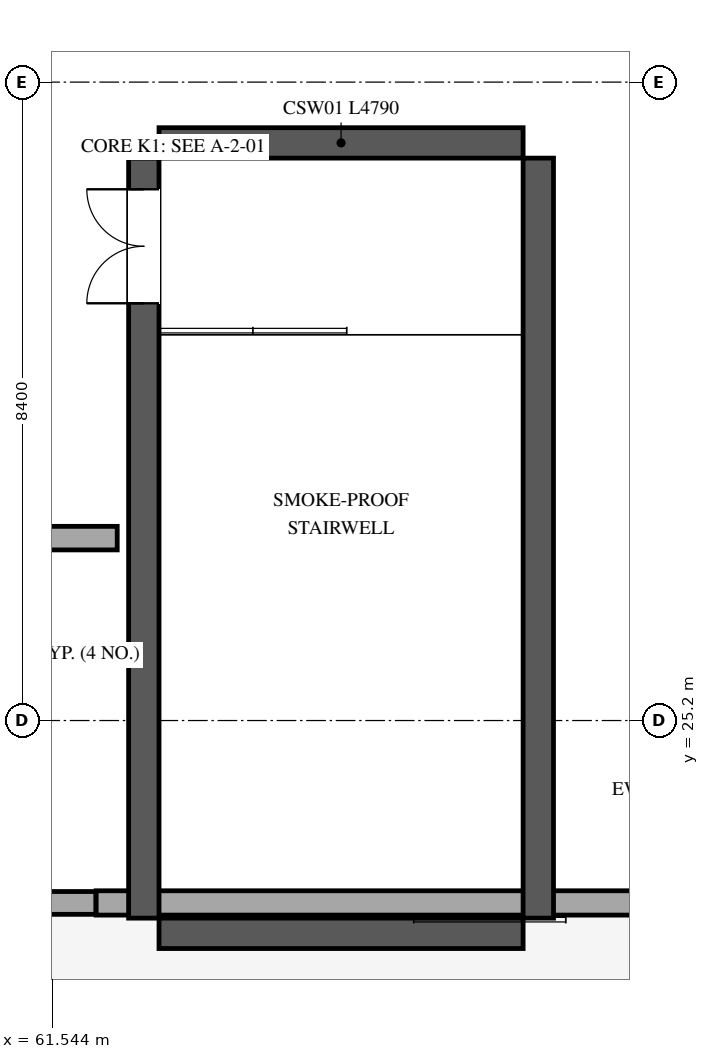
"""IFC4 building model, lengths in metres.
Left out: names, types, materials, properties, quantities, classifications, styles, units other than length and angle.
Written with IfcOpenShell. Run it as: python <this file> out.ifc"""

import sys

from ifc_helpers import new_model, si_unit, direction, frame, frame_2d, origin, place, context, subcontext, project, spatial, rectangle, extrude, element, fill, save


model = new_model("IFC4")
c1 = context("Model", 3, precision=1e-05, world=origin(), true_north=direction((0.0, 1.0)))
c2 = subcontext(c1, "Body", "Model", "MODEL_VIEW")
j1 = project(units=[si_unit("LENGTHUNIT", "METRE"), si_unit("PLANEANGLEUNIT", "RADIAN")], contexts=[c1])
p1 = place(None, origin())
s1 = spatial("IfcSite", under=j1, at=p1, CompositionType="ELEMENT")
p2 = place(p1, origin())
s2 = spatial("IfcBuilding", under=s1, at=p2, CompositionType="ELEMENT")
p3 = place(p2, frame((0.0, 0.0, 36.3)))
s3 = spatial("IfcBuildingStorey", under=s2, at=p3, CompositionType="ELEMENT", Elevation=36.3)
p4 = place(p3, frame((69.6, 22.8, 0.0), z_axis=(0.0, 0.0, 1.0), x_axis=(-1.0, 0.0, 0.0)))
e1 = element("IfcWall", 1, at=p4, inside=s3, PredefinedType="STANDARD", context=c2, shape_type="SweptSolid", body=[
    extrude(rectangle(XDim=7.478, YDim=0.32, at=frame_2d((3.739, 0.0))), origin(), (0.0, 0.0, 1.0), 4.49),
])
p5 = place(p3, frame((62.118, 22.8, 0.0), z_axis=(0.0, 0.0, 1.0), x_axis=(-1.0, 0.0, 0.0)))
e2 = element("IfcWall", 2, at=p5, inside=s3, PredefinedType="STANDARD", context=c2, shape_type="SweptSolid", body=[
    extrude(rectangle(XDim=7.476, YDim=0.3, at=frame_2d((3.738, 0.0))), origin(), (0.0, 0.0, 1.0), 4.49),
])
p6 = place(p5, frame((2.788, 0.0, 0.0)))
e3 = element("IfcOpeningElement", 3, at=p6, cuts=e2, PredefinedType="OPENING", context=c2, shape_type="SweptSolid", body=[
    extrude(rectangle(XDim=1.9, YDim=2.2, at=frame_2d((0.95, 1.1))), frame((0.0, 0.16, 0.0), z_axis=(0.0, -1.0, 0.0), x_axis=(1.0, 0.0, 0.0)), (0.0, 0.0, 1.0), 0.32),
])
p7 = place(p3, frame((62.75, 22.6, 0.0), z_axis=(0.0, 0.0, 1.0), x_axis=(0.0, 1.0, 0.0)))
e4 = element("IfcWall", 4, at=p7, inside=s3, PredefinedType="SHEAR", context=c2, shape_type="SweptSolid", body=[
    extrude(rectangle(XDim=10.0, YDim=0.4, at=frame_2d((5.0, 0.0))), origin(), (0.0, 0.0, 1.0), 4.8),
])
p8 = place(p7, frame((8.09, 0.0, 0.0)))
e5 = element("IfcOpeningElement", 5, at=p8, cuts=e4, PredefinedType="OPENING", context=c2, shape_type="SweptSolid", body=[
    extrude(rectangle(XDim=1.5, YDim=2.2, at=frame_2d((0.75, 1.1))), frame((0.0, 0.21, 0.0), z_axis=(0.0, -1.0, 0.0), x_axis=(1.0, 0.0, 0.0)), (0.0, 0.0, 1.0), 0.42),
])
p9 = place(p3, frame((67.94, 32.6, 0.0), z_axis=(0.0, 0.0, 1.0), x_axis=(0.0, -1.0, 0.0)))
e6 = element("IfcWall", 6, at=p9, inside=s3, PredefinedType="SHEAR", context=c2, shape_type="SweptSolid", body=[
    extrude(rectangle(XDim=10.0, YDim=0.4, at=frame_2d((5.0, 0.0))), origin(), (0.0, 0.0, 1.0), 4.8),
])
for number, where, z_axis, x_axis in (
    (7, (67.74, 22.4, 0.0), (0.0, 0.0, 1.0), (-1.0, 0.0, 0.0)),
    (8, (62.95, 32.8, 0.0), (0.0, 0.0, 1.0), (1.0, 0.0, 0.0)),
):
    element("IfcWall", number, at=place(p3, frame(where, z_axis=z_axis, x_axis=x_axis)), inside=s3, PredefinedType="SHEAR", context=c2, shape_type="SweptSolid", body=[
        extrude(rectangle(XDim=4.79, YDim=0.4, at=frame_2d((2.395, 0.0))), origin(), (0.0, 0.0, 1.0), 4.8),
    ])
p10 = place(p3, frame((62.4, 27.6, 0.0), z_axis=(0.0, 0.0, 1.0), x_axis=(-1.0, 0.0, 0.0)))
e9 = element("IfcWall", 9, at=p10, inside=s3, PredefinedType="STANDARD", context=c2, shape_type="SweptSolid", body=[
    extrude(rectangle(XDim=5.6, YDim=0.31, at=frame_2d((2.8, 0.0))), origin(), (0.0, 0.0, 1.0), 3.8),
])
p11 = place(p10, frame((1.875, 0.0, 0.0)))
e10 = element("IfcOpeningElement", 10, at=p11, cuts=e9, PredefinedType="OPENING", context=c2, shape_type="SweptSolid", body=[
    extrude(rectangle(XDim=1.85, YDim=2.3, at=frame_2d((0.925, 1.15))), frame((0.0, 0.165, 0.0), z_axis=(0.0, -1.0, 0.0), x_axis=(1.0, 0.0, 0.0)), (0.0, 0.0, 1.0), 0.33),
])
p12 = place(p8, origin())
e11 = element("IfcDoor", 11, at=p12, inside=s3, OperationType="DOUBLE_DOOR_SINGLE_SWING", PredefinedType="DOOR", context=c2, shape_type="SweptSolid", body=[
    extrude(rectangle(XDim=1.5, YDim=2.2, at=frame_2d((0.75, 1.1))), frame((0.0, 0.025, 0.0), z_axis=(0.0, -1.0, 0.0), x_axis=(1.0, 0.0, 0.0)), (0.0, 0.0, 1.0), 0.05),
])
fill(e5, e11)
save(model, sys.argv[1])
